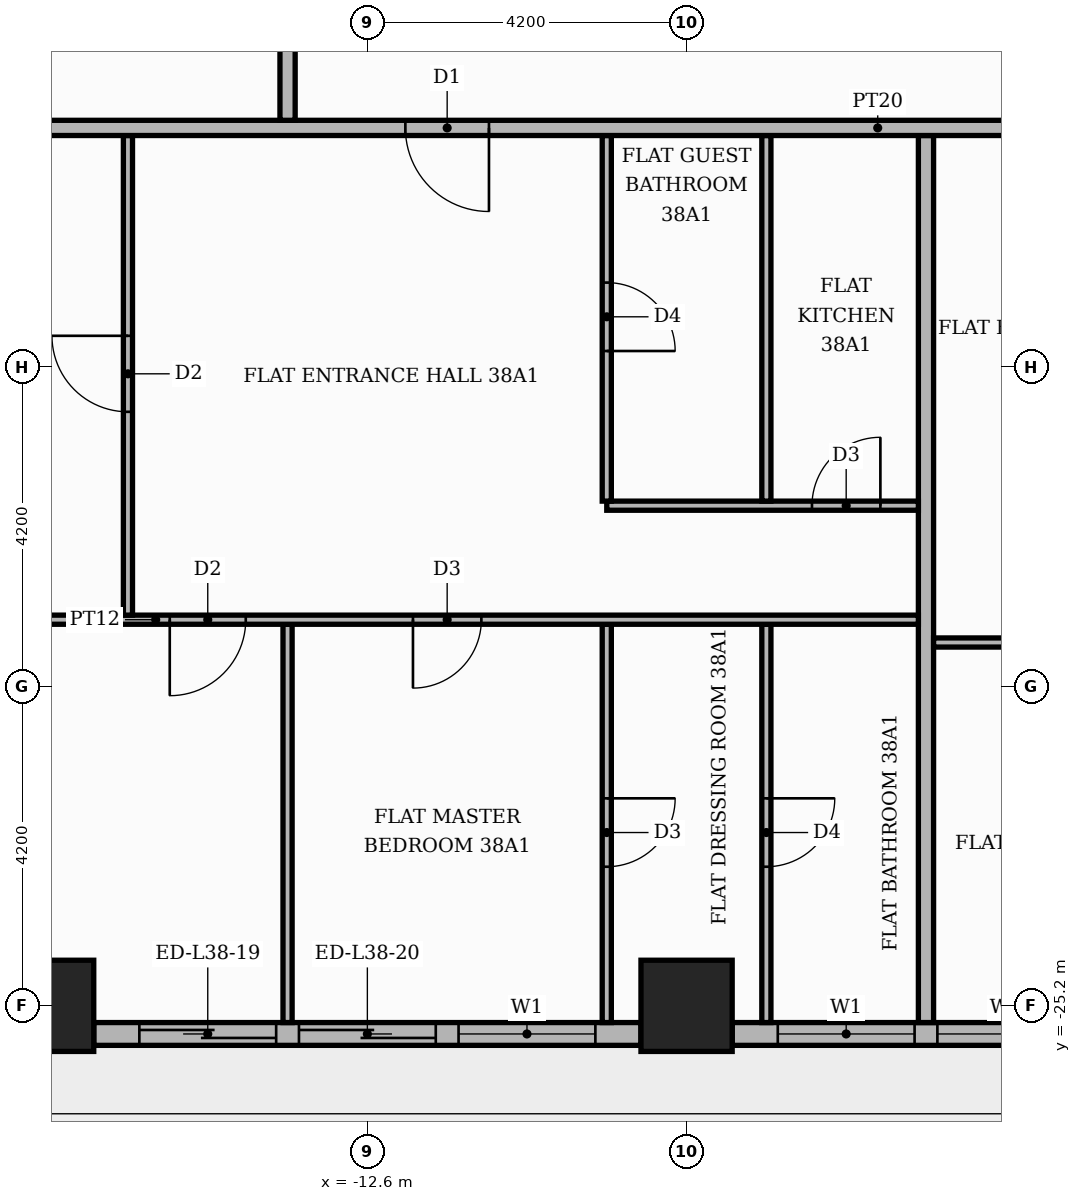
"""IFC4 building model, lengths in metres.
Left out: names, types, materials, properties, quantities, classifications, styles, units other than length and angle.
Written with IfcOpenShell. Run it as: python <this file> out.ifc"""

import sys

from ifc_helpers import new_model, si_unit, direction, frame, frame_2d, origin, origin_2d, place, context, subcontext, project, spatial, rectangle, extrude, element, fill, save


model = new_model("IFC4")
c1 = context("Model", 3, precision=1e-05, world=origin(), true_north=direction((0.0, 1.0)))
c2 = subcontext(c1, "Body", "Model", "MODEL_VIEW")
j1 = project(units=[si_unit("LENGTHUNIT", "METRE"), si_unit("PLANEANGLEUNIT", "RADIAN")], contexts=[c1])
p1 = place(None, origin())
s1 = spatial("IfcSite", under=j1, at=p1, CompositionType="ELEMENT")
p2 = place(p1, origin())
s2 = spatial("IfcBuilding", under=s1, at=p2, CompositionType="ELEMENT")
p3 = place(p2, frame((0.0, 0.0, 161.1)))
s3 = spatial("IfcBuildingStorey", under=s2, at=p3, CompositionType="ELEMENT", Elevation=161.1)
for number, where, z_axis, x_axis in (
    (1, (-8.4, -25.2, 0.0), (0.0, 0.0, 1.0), (1.0, 0.0, 0.0)),
    (2, (-16.8, -25.2, 0.0), (0.0, 0.0, 1.0), (1.0, 0.0, 0.0)),
):
    element("IfcColumn", number, at=place(p3, frame(where, z_axis=z_axis, x_axis=x_axis)), inside=s3, PredefinedType="COLUMN", context=c2, shape_type="SweptSolid", body=[
        extrude(rectangle(XDim=1.2, YDim=1.2, at=origin_2d()), origin(), (0.0, 0.0, 1.0), 3.9),
    ])
p4 = place(p3, frame((-16.2, -25.57, 0.0), z_axis=(0.0, 0.0, 1.0), x_axis=(1.0, 0.0, 0.0)))
e3 = element("IfcWall", 3, at=p4, inside=s3, PredefinedType="STANDARD", context=c2, shape_type="SweptSolid", body=[
    extrude(rectangle(XDim=7.2, YDim=0.3, at=frame_2d((3.6, 0.0))), origin(), (0.0, 0.0, 1.0), 3.48),
])
p5 = place(p4, frame((0.6, 0.0, 0.0)))
e4 = element("IfcOpeningElement", 4, at=p5, cuts=e3, PredefinedType="OPENING", context=c2, shape_type="SweptSolid", body=[
    extrude(rectangle(XDim=1.8, YDim=2.4, at=frame_2d((0.9, 1.2))), frame((0.0, 0.16, 0.0), z_axis=(0.0, -1.0, 0.0), x_axis=(1.0, 0.0, 0.0)), (0.0, 0.0, 1.0), 0.32),
])
p6 = place(p4, frame((2.7, 0.0, 0.0)))
e5 = element("IfcOpeningElement", 5, at=p6, cuts=e3, PredefinedType="OPENING", context=c2, shape_type="SweptSolid", body=[
    extrude(rectangle(XDim=1.8, YDim=2.4, at=frame_2d((0.9, 1.2))), frame((0.0, 0.16, 0.0), z_axis=(0.0, -1.0, 0.0), x_axis=(1.0, 0.0, 0.0)), (0.0, 0.0, 1.0), 0.32),
])
p7 = place(p4, frame((4.8, 0.0, 0.9)))
e6 = element("IfcOpeningElement", 6, at=p7, cuts=e3, PredefinedType="OPENING", context=c2, shape_type="SweptSolid", body=[
    extrude(rectangle(XDim=1.8, YDim=2.1, at=frame_2d((0.9, 1.05))), frame((0.0, 0.16, 0.0), z_axis=(0.0, -1.0, 0.0), x_axis=(1.0, 0.0, 0.0)), (0.0, 0.0, 1.0), 0.32),
])
p8 = place(p3, frame((-7.8, -25.57, 0.0), z_axis=(0.0, 0.0, 1.0), x_axis=(1.0, 0.0, 0.0)))
e7 = element("IfcWall", 7, at=p8, inside=s3, PredefinedType="STANDARD", context=c2, shape_type="SweptSolid", body=[
    extrude(rectangle(XDim=7.2, YDim=0.3, at=frame_2d((3.6, 0.0))), origin(), (0.0, 0.0, 1.0), 3.48),
])
p9 = place(p8, frame((0.6, 0.0, 0.9)))
e8 = element("IfcOpeningElement", 8, at=p9, cuts=e7, PredefinedType="OPENING", context=c2, shape_type="SweptSolid", body=[
    extrude(rectangle(XDim=1.8, YDim=2.1, at=frame_2d((0.9, 1.05))), frame((0.0, 0.16, 0.0), z_axis=(0.0, -1.0, 0.0), x_axis=(1.0, 0.0, 0.0)), (0.0, 0.0, 1.0), 0.32),
])
p10 = place(p8, frame((2.7, 0.0, 0.9)))
e9 = element("IfcOpeningElement", 9, at=p10, cuts=e7, PredefinedType="OPENING", context=c2, shape_type="SweptSolid", body=[
    extrude(rectangle(XDim=1.8, YDim=2.1, at=frame_2d((0.9, 1.05))), frame((0.0, 0.16, 0.0), z_axis=(0.0, -1.0, 0.0), x_axis=(1.0, 0.0, 0.0)), (0.0, 0.0, 1.0), 0.32),
])
p11 = place(p8, frame((4.8, 0.0, 0.0)))
e10 = element("IfcOpeningElement", 10, at=p11, cuts=e7, PredefinedType="OPENING", context=c2, shape_type="SweptSolid", body=[
    extrude(rectangle(XDim=1.8, YDim=2.4, at=frame_2d((0.9, 1.2))), frame((0.0, 0.16, 0.0), z_axis=(0.0, -1.0, 0.0), x_axis=(1.0, 0.0, 0.0)), (0.0, 0.0, 1.0), 0.32),
])
p12 = place(p3, frame((-13.65, -25.42, 0.0), z_axis=(0.0, 0.0, 1.0), x_axis=(0.0, 1.0, 0.0)))
e11 = element("IfcWall", 11, at=p12, inside=s3, PredefinedType="PARTITIONING", context=c2, shape_type="SweptSolid", body=[
    extrude(rectangle(XDim=5.24, YDim=0.12, at=frame_2d((2.62, 0.0))), origin(), (0.0, 0.0, 1.0), 3.48),
])
p13 = place(p3, frame((-9.45, -25.42, 0.0), z_axis=(0.0, 0.0, 1.0), x_axis=(0.0, 1.0, 0.0)))
e12 = element("IfcWall", 12, at=p13, inside=s3, PredefinedType="PARTITIONING", context=c2, shape_type="SweptSolid", body=[
    extrude(rectangle(XDim=5.24, YDim=0.12, at=frame_2d((2.62, 0.0))), origin(), (0.0, 0.0, 1.0), 3.48),
])
p14 = place(p13, frame((2.05, 0.0, 0.0)))
e13 = element("IfcOpeningElement", 13, at=p14, cuts=e12, PredefinedType="OPENING", context=c2, shape_type="SweptSolid", body=[
    extrude(rectangle(XDim=0.9, YDim=2.1, at=frame_2d((0.45, 1.05))), frame((0.0, 0.07, 0.0), z_axis=(0.0, -1.0, 0.0), x_axis=(1.0, 0.0, 0.0)), (0.0, 0.0, 1.0), 0.14),
])
p15 = place(p3, frame((-7.35, -25.42, 0.0), z_axis=(0.0, 0.0, 1.0), x_axis=(0.0, 1.0, 0.0)))
e14 = element("IfcWall", 14, at=p15, inside=s3, PredefinedType="PARTITIONING", context=c2, shape_type="SweptSolid", body=[
    extrude(rectangle(XDim=5.24, YDim=0.12, at=frame_2d((2.62, 0.0))), origin(), (0.0, 0.0, 1.0), 3.48),
])
p16 = place(p15, frame((2.05, 0.0, 0.0)))
e15 = element("IfcOpeningElement", 15, at=p16, cuts=e14, PredefinedType="OPENING", context=c2, shape_type="SweptSolid", body=[
    extrude(rectangle(XDim=0.9, YDim=2.1, at=frame_2d((0.45, 1.05))), frame((0.0, 0.07, 0.0), z_axis=(0.0, -1.0, 0.0), x_axis=(1.0, 0.0, 0.0)), (0.0, 0.0, 1.0), 0.14),
])
p17 = place(p3, frame((-5.25, -25.42, 0.0), z_axis=(0.0, 0.0, 1.0), x_axis=(0.0, 1.0, 0.0)))
e16 = element("IfcWall", 16, at=p17, inside=s3, PredefinedType="PARTITIONING", context=c2, shape_type="SweptSolid", body=[
    extrude(rectangle(XDim=11.67, YDim=0.2, at=frame_2d((5.835, 0.0))), origin(), (0.0, 0.0, 1.0), 3.48),
])
p18 = place(p3, frame((-5.15, -20.42, 0.0), z_axis=(0.0, 0.0, 1.0), x_axis=(1.0, 0.0, 0.0)))
e17 = element("IfcWall", 17, at=p18, inside=s3, PredefinedType="PARTITIONING", context=c2, shape_type="SweptSolid", body=[
    extrude(rectangle(XDim=18.7, YDim=0.12, at=frame_2d((9.35, 0.0))), origin(), (0.0, 0.0, 1.0), 3.48),
])
p19 = place(p18, frame((1.5, 0.0, 0.0)))
e18 = element("IfcOpeningElement", 18, at=p19, cuts=e17, PredefinedType="OPENING", context=c2, shape_type="SweptSolid", body=[
    extrude(rectangle(XDim=1.0, YDim=2.1, at=frame_2d((0.5, 1.05))), frame((0.0, 0.07, 0.0), z_axis=(0.0, -1.0, 0.0), x_axis=(1.0, 0.0, 0.0)), (0.0, 0.0, 1.0), 0.14),
])
p20 = place(p18, frame((5.75, 0.0, 0.0)))
e19 = element("IfcOpeningElement", 19, at=p20, cuts=e17, PredefinedType="OPENING", context=c2, shape_type="SweptSolid", body=[
    extrude(rectangle(XDim=0.9, YDim=2.1, at=frame_2d((0.45, 1.05))), frame((0.0, 0.07, 0.0), z_axis=(0.0, -1.0, 0.0), x_axis=(1.0, 0.0, 0.0)), (0.0, 0.0, 1.0), 0.14),
])
p21 = place(p18, frame((14.15, 0.0, 0.0)))
e20 = element("IfcOpeningElement", 20, at=p21, cuts=e17, PredefinedType="OPENING", context=c2, shape_type="SweptSolid", body=[
    extrude(rectangle(XDim=0.9, YDim=2.1, at=frame_2d((0.45, 1.05))), frame((0.0, 0.07, 0.0), z_axis=(0.0, -1.0, 0.0), x_axis=(1.0, 0.0, 0.0)), (0.0, 0.0, 1.0), 0.14),
])
p22 = place(p3, frame((-25.42, -20.12, 0.0), z_axis=(0.0, 0.0, 1.0), x_axis=(1.0, 0.0, 0.0)))
e21 = element("IfcWall", 21, at=p22, inside=s3, PredefinedType="PARTITIONING", context=c2, shape_type="SweptSolid", body=[
    extrude(rectangle(XDim=20.07, YDim=0.12, at=frame_2d((10.035, 0.0))), origin(), (0.0, 0.0, 1.0), 3.48),
])
p23 = place(p22, frame((10.22, 0.0, 0.0)))
e22 = element("IfcOpeningElement", 22, at=p23, cuts=e21, PredefinedType="OPENING", context=c2, shape_type="SweptSolid", body=[
    extrude(rectangle(XDim=1.0, YDim=2.1, at=frame_2d((0.5, 1.05))), frame((0.0, 0.07, 0.0), z_axis=(0.0, -1.0, 0.0), x_axis=(1.0, 0.0, 0.0)), (0.0, 0.0, 1.0), 0.14),
])
p24 = place(p22, frame((13.42, 0.0, 0.0)))
e23 = element("IfcOpeningElement", 23, at=p24, cuts=e21, PredefinedType="OPENING", context=c2, shape_type="SweptSolid", body=[
    extrude(rectangle(XDim=0.9, YDim=2.1, at=frame_2d((0.45, 1.05))), frame((0.0, 0.07, 0.0), z_axis=(0.0, -1.0, 0.0), x_axis=(1.0, 0.0, 0.0)), (0.0, 0.0, 1.0), 0.14),
])
p25 = place(p3, frame((-15.75, -20.06, 0.0), z_axis=(0.0, 0.0, 1.0), x_axis=(0.0, 1.0, 0.0)))
e24 = element("IfcWall", 24, at=p25, inside=s3, PredefinedType="PARTITIONING", context=c2, shape_type="SweptSolid", body=[
    extrude(rectangle(XDim=6.31, YDim=0.12, at=frame_2d((3.155, 0.0))), origin(), (0.0, 0.0, 1.0), 3.48),
])
p26 = place(p25, frame((2.675, 0.0, 0.0)))
e25 = element("IfcOpeningElement", 25, at=p26, cuts=e24, PredefinedType="OPENING", context=c2, shape_type="SweptSolid", body=[
    extrude(rectangle(XDim=1.0, YDim=2.1, at=frame_2d((0.5, 1.05))), frame((0.0, 0.07, 0.0), z_axis=(0.0, -1.0, 0.0), x_axis=(1.0, 0.0, 0.0)), (0.0, 0.0, 1.0), 0.14),
])
p27 = place(p3, frame((-9.45, -18.62, 0.0), z_axis=(0.0, 0.0, 1.0), x_axis=(1.0, 0.0, 0.0)))
e26 = element("IfcWall", 26, at=p27, inside=s3, PredefinedType="PARTITIONING", context=c2, shape_type="SweptSolid", body=[
    extrude(rectangle(XDim=4.1, YDim=0.12, at=frame_2d((2.05, 0.0))), origin(), (0.0, 0.0, 1.0), 3.48),
])
p28 = place(p27, frame((2.7, 0.0, 0.0)))
e27 = element("IfcOpeningElement", 27, at=p28, cuts=e26, PredefinedType="OPENING", context=c2, shape_type="SweptSolid", body=[
    extrude(rectangle(XDim=0.9, YDim=2.1, at=frame_2d((0.45, 1.05))), frame((0.0, 0.07, 0.0), z_axis=(0.0, -1.0, 0.0), x_axis=(1.0, 0.0, 0.0)), (0.0, 0.0, 1.0), 0.14),
])
p29 = place(p3, frame((-9.45, -18.56, 0.0), z_axis=(0.0, 0.0, 1.0), x_axis=(0.0, 1.0, 0.0)))
e28 = element("IfcWall", 28, at=p29, inside=s3, PredefinedType="PARTITIONING", context=c2, shape_type="SweptSolid", body=[
    extrude(rectangle(XDim=4.81, YDim=0.12, at=frame_2d((2.405, 0.0))), origin(), (0.0, 0.0, 1.0), 3.48),
])
p30 = place(p29, frame((1.975, 0.0, 0.0)))
e29 = element("IfcOpeningElement", 29, at=p30, cuts=e28, PredefinedType="OPENING", context=c2, shape_type="SweptSolid", body=[
    extrude(rectangle(XDim=0.9, YDim=2.1, at=frame_2d((0.45, 1.05))), frame((0.0, 0.07, 0.0), z_axis=(0.0, -1.0, 0.0), x_axis=(1.0, 0.0, 0.0)), (0.0, 0.0, 1.0), 0.14),
])
p31 = place(p3, frame((-7.35, -18.56, 0.0), z_axis=(0.0, 0.0, 1.0), x_axis=(0.0, 1.0, 0.0)))
e30 = element("IfcWall", 30, at=p31, inside=s3, PredefinedType="PARTITIONING", context=c2, shape_type="SweptSolid", body=[
    extrude(rectangle(XDim=4.81, YDim=0.12, at=frame_2d((2.405, 0.0))), origin(), (0.0, 0.0, 1.0), 3.48),
])
p32 = place(p3, frame((-25.42, -13.65, 0.0), z_axis=(0.0, 0.0, 1.0), x_axis=(1.0, 0.0, 0.0)))
e31 = element("IfcWall", 31, at=p32, inside=s3, PredefinedType="PARTITIONING", context=c2, shape_type="SweptSolid", body=[
    extrude(rectangle(XDim=39.07, YDim=0.2, at=frame_2d((19.535, 0.0))), origin(), (0.0, 0.0, 1.0), 3.48),
])
p33 = place(p32, frame((13.32, 0.0, 0.0)))
e32 = element("IfcOpeningElement", 32, at=p33, cuts=e31, PredefinedType="OPENING", context=c2, shape_type="SweptSolid", body=[
    extrude(rectangle(XDim=1.1, YDim=2.4, at=frame_2d((0.55, 1.2))), frame((0.0, 0.11, 0.0), z_axis=(0.0, -1.0, 0.0), x_axis=(1.0, 0.0, 0.0)), (0.0, 0.0, 1.0), 0.22),
])
p34 = place(p32, frame((21.72, 0.0, 0.0)))
e33 = element("IfcOpeningElement", 33, at=p34, cuts=e31, PredefinedType="OPENING", context=c2, shape_type="SweptSolid", body=[
    extrude(rectangle(XDim=1.1, YDim=2.4, at=frame_2d((0.55, 1.2))), frame((0.0, 0.11, 0.0), z_axis=(0.0, -1.0, 0.0), x_axis=(1.0, 0.0, 0.0)), (0.0, 0.0, 1.0), 0.22),
])
p35 = place(p3, frame((-13.65, -13.55, 0.0), z_axis=(0.0, 0.0, 1.0), x_axis=(0.0, 1.0, 0.0)))
e34 = element("IfcWall", 34, at=p35, inside=s3, PredefinedType="PARTITIONING", context=c2, shape_type="SweptSolid", body=[
    extrude(rectangle(XDim=2.45, YDim=0.2, at=frame_2d((1.225, 0.0))), origin(), (0.0, 0.0, 1.0), 3.48),
])
p36 = place(p5, origin())
e35 = element("IfcDoor", 35, at=p36, inside=s3, OperationType="SLIDING_TO_LEFT", PredefinedType="DOOR", context=c2, shape_type="SweptSolid", body=[
    extrude(rectangle(XDim=1.8, YDim=2.4, at=frame_2d((0.9, 1.2))), frame((0.0, 0.025, 0.0), z_axis=(0.0, -1.0, 0.0), x_axis=(1.0, 0.0, 0.0)), (0.0, 0.0, 1.0), 0.05),
])
fill(e4, e35)
p37 = place(p6, origin())
e36 = element("IfcDoor", 36, at=p37, inside=s3, OperationType="SLIDING_TO_RIGHT", PredefinedType="DOOR", context=c2, shape_type="SweptSolid", body=[
    extrude(rectangle(XDim=1.8, YDim=2.4, at=frame_2d((0.9, 1.2))), frame((0.0, 0.025, 0.0), z_axis=(0.0, -1.0, 0.0), x_axis=(1.0, 0.0, 0.0)), (0.0, 0.0, 1.0), 0.05),
])
fill(e5, e36)
p38 = place(p7, origin())
e37 = element("IfcWindow", 37, at=p38, inside=s3, PartitioningType="SINGLE_PANEL", PredefinedType="WINDOW", context=c2, shape_type="SweptSolid", body=[
    extrude(rectangle(XDim=1.8, YDim=2.1, at=frame_2d((0.9, 1.05))), frame((0.0, 0.03, 0.0), z_axis=(0.0, -1.0, 0.0), x_axis=(1.0, 0.0, 0.0)), (0.0, 0.0, 1.0), 0.06),
])
fill(e6, e37)
p39 = place(p9, origin())
e38 = element("IfcWindow", 38, at=p39, inside=s3, PartitioningType="SINGLE_PANEL", PredefinedType="WINDOW", context=c2, shape_type="SweptSolid", body=[
    extrude(rectangle(XDim=1.8, YDim=2.1, at=frame_2d((0.9, 1.05))), frame((0.0, 0.03, 0.0), z_axis=(0.0, -1.0, 0.0), x_axis=(1.0, 0.0, 0.0)), (0.0, 0.0, 1.0), 0.06),
])
fill(e8, e38)
p40 = place(p10, origin())
e39 = element("IfcWindow", 39, at=p40, inside=s3, PartitioningType="SINGLE_PANEL", PredefinedType="WINDOW", context=c2, shape_type="SweptSolid", body=[
    extrude(rectangle(XDim=1.8, YDim=2.1, at=frame_2d((0.9, 1.05))), frame((0.0, 0.03, 0.0), z_axis=(0.0, -1.0, 0.0), x_axis=(1.0, 0.0, 0.0)), (0.0, 0.0, 1.0), 0.06),
])
fill(e9, e39)
p41 = place(p33, frame((1.1, 0.0, 0.0), z_axis=(0.0, 0.0, 1.0), x_axis=(-1.0, 0.0, 0.0)))
e40 = element("IfcDoor", 40, at=p41, inside=s3, OperationType="SINGLE_SWING_RIGHT", PredefinedType="DOOR", context=c2, shape_type="SweptSolid", body=[
    extrude(rectangle(XDim=1.1, YDim=2.4, at=frame_2d((0.55, 1.2))), frame((0.0, 0.025, 0.0), z_axis=(0.0, -1.0, 0.0), x_axis=(1.0, 0.0, 0.0)), (0.0, 0.0, 1.0), 0.05),
])
fill(e32, e40)
p42 = place(p26, origin())
e41 = element("IfcDoor", 41, at=p42, inside=s3, OperationType="SINGLE_SWING_RIGHT", PredefinedType="DOOR", context=c2, shape_type="SweptSolid", body=[
    extrude(rectangle(XDim=1.0, YDim=2.1, at=frame_2d((0.5, 1.05))), frame((0.0, 0.025, 0.0), z_axis=(0.0, -1.0, 0.0), x_axis=(1.0, 0.0, 0.0)), (0.0, 0.0, 1.0), 0.05),
])
fill(e25, e41)
p43 = place(p30, frame((0.9, 0.0, 0.0), z_axis=(0.0, 0.0, 1.0), x_axis=(-1.0, 0.0, 0.0)))
e42 = element("IfcDoor", 42, at=p43, inside=s3, OperationType="SINGLE_SWING_LEFT", PredefinedType="DOOR", context=c2, shape_type="SweptSolid", body=[
    extrude(rectangle(XDim=0.9, YDim=2.1, at=frame_2d((0.45, 1.05))), frame((0.0, 0.025, 0.0), z_axis=(0.0, -1.0, 0.0), x_axis=(1.0, 0.0, 0.0)), (0.0, 0.0, 1.0), 0.05),
])
fill(e29, e42)
p44 = place(p28, origin())
e43 = element("IfcDoor", 43, at=p44, inside=s3, OperationType="SINGLE_SWING_RIGHT", PredefinedType="DOOR", context=c2, shape_type="SweptSolid", body=[
    extrude(rectangle(XDim=0.9, YDim=2.1, at=frame_2d((0.45, 1.05))), frame((0.0, 0.025, 0.0), z_axis=(0.0, -1.0, 0.0), x_axis=(1.0, 0.0, 0.0)), (0.0, 0.0, 1.0), 0.05),
])
fill(e27, e43)
p45 = place(p23, frame((1.0, 0.0, 0.0), z_axis=(0.0, 0.0, 1.0), x_axis=(-1.0, 0.0, 0.0)))
e44 = element("IfcDoor", 44, at=p45, inside=s3, OperationType="SINGLE_SWING_LEFT", PredefinedType="DOOR", context=c2, shape_type="SweptSolid", body=[
    extrude(rectangle(XDim=1.0, YDim=2.1, at=frame_2d((0.5, 1.05))), frame((0.0, 0.025, 0.0), z_axis=(0.0, -1.0, 0.0), x_axis=(1.0, 0.0, 0.0)), (0.0, 0.0, 1.0), 0.05),
])
fill(e22, e44)
p46 = place(p24, frame((0.9, 0.0, 0.0), z_axis=(0.0, 0.0, 1.0), x_axis=(-1.0, 0.0, 0.0)))
e45 = element("IfcDoor", 45, at=p46, inside=s3, OperationType="SINGLE_SWING_LEFT", PredefinedType="DOOR", context=c2, shape_type="SweptSolid", body=[
    extrude(rectangle(XDim=0.9, YDim=2.1, at=frame_2d((0.45, 1.05))), frame((0.0, 0.025, 0.0), z_axis=(0.0, -1.0, 0.0), x_axis=(1.0, 0.0, 0.0)), (0.0, 0.0, 1.0), 0.05),
])
fill(e23, e45)
p47 = place(p14, frame((0.9, 0.0, 0.0), z_axis=(0.0, 0.0, 1.0), x_axis=(-1.0, 0.0, 0.0)))
e46 = element("IfcDoor", 46, at=p47, inside=s3, OperationType="SINGLE_SWING_RIGHT", PredefinedType="DOOR", context=c2, shape_type="SweptSolid", body=[
    extrude(rectangle(XDim=0.9, YDim=2.1, at=frame_2d((0.45, 1.05))), frame((0.0, 0.025, 0.0), z_axis=(0.0, -1.0, 0.0), x_axis=(1.0, 0.0, 0.0)), (0.0, 0.0, 1.0), 0.05),
])
fill(e13, e46)
p48 = place(p16, frame((0.9, 0.0, 0.0), z_axis=(0.0, 0.0, 1.0), x_axis=(-1.0, 0.0, 0.0)))
e47 = element("IfcDoor", 47, at=p48, inside=s3, OperationType="SINGLE_SWING_RIGHT", PredefinedType="DOOR", context=c2, shape_type="SweptSolid", body=[
    extrude(rectangle(XDim=0.9, YDim=2.1, at=frame_2d((0.45, 1.05))), frame((0.0, 0.025, 0.0), z_axis=(0.0, -1.0, 0.0), x_axis=(1.0, 0.0, 0.0)), (0.0, 0.0, 1.0), 0.05),
])
fill(e15, e47)
save(model, sys.argv[1])
